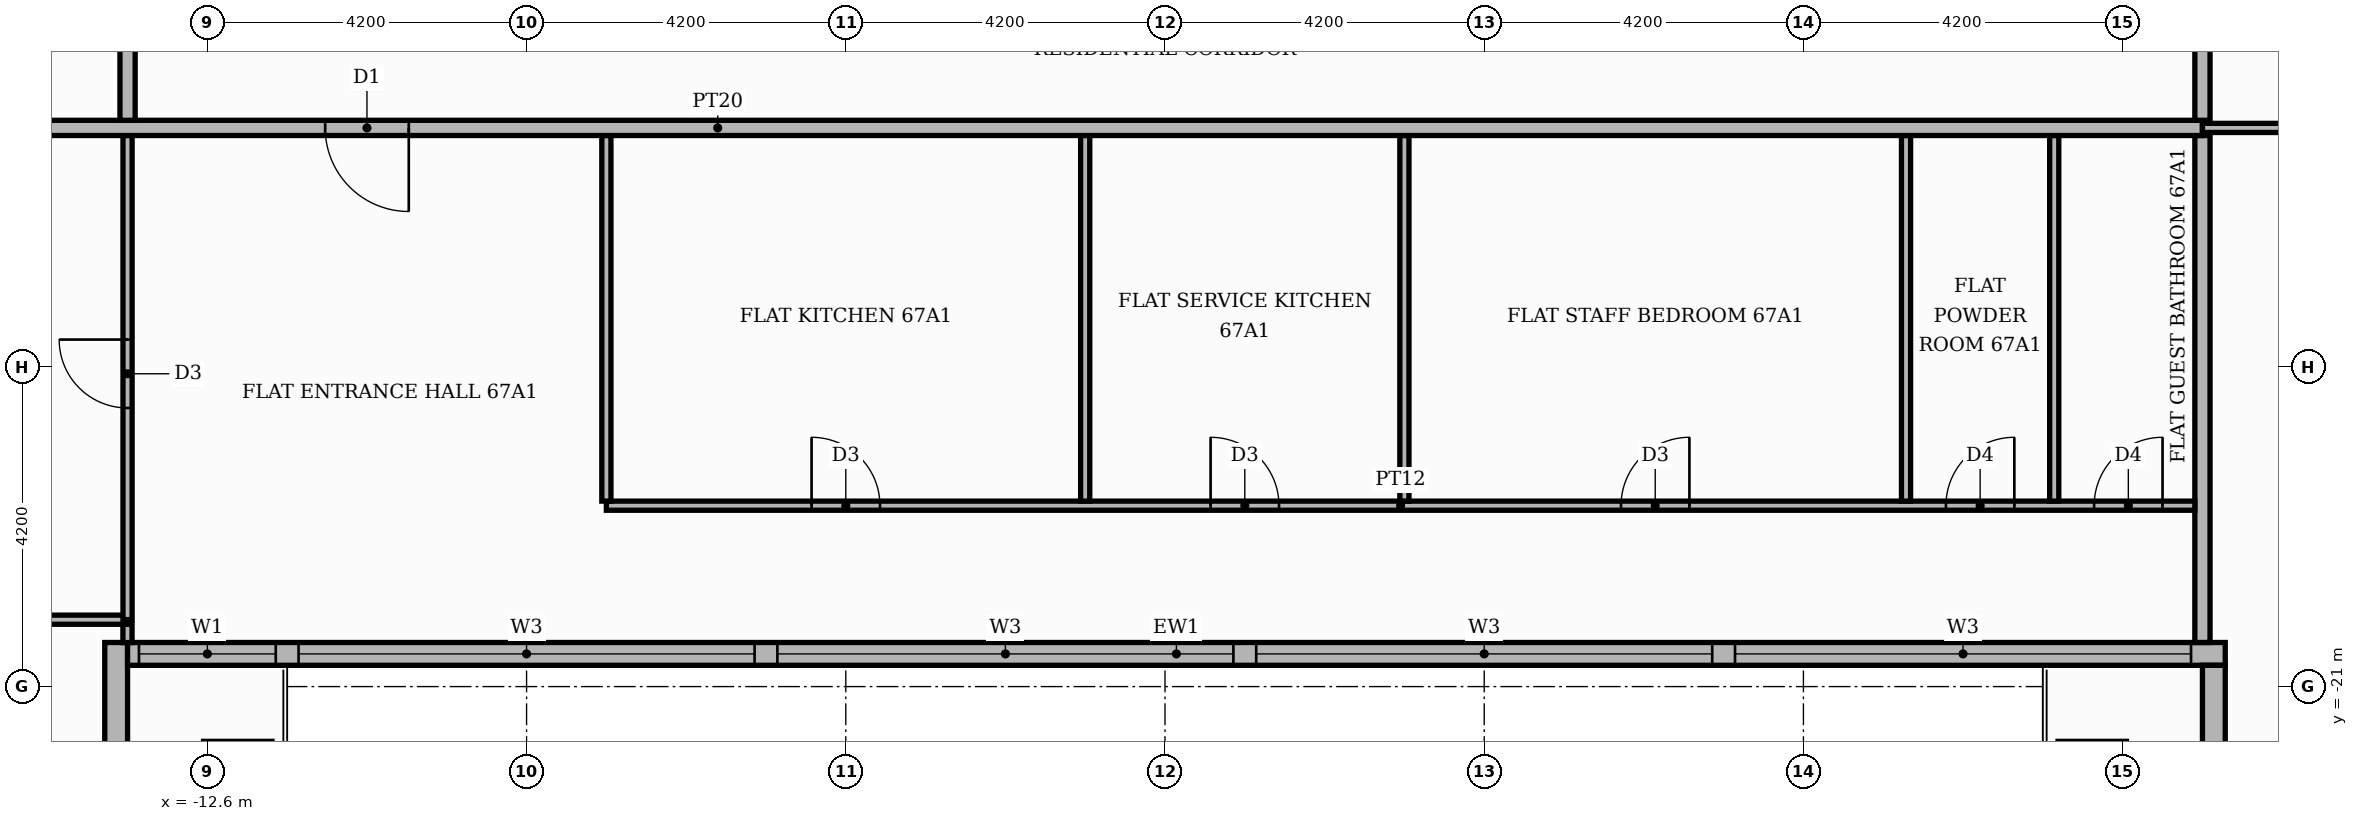
"""IFC4 building model, lengths in metres.
Left out: names, types, materials, properties, quantities, classifications, styles, units other than length and angle.
Written with IfcOpenShell. Run it as: python <this file> out.ifc"""

import sys

from ifc_helpers import new_model, si_unit, direction, frame, frame_2d, origin, place, context, subcontext, project, spatial, rectangle, extrude, element, fill, save


model = new_model("IFC4")
c1 = context("Model", 3, precision=1e-05, world=origin(), true_north=direction((0.0, 1.0)))
c2 = subcontext(c1, "Body", "Model", "MODEL_VIEW")
j1 = project(units=[si_unit("LENGTHUNIT", "METRE"), si_unit("PLANEANGLEUNIT", "RADIAN")], contexts=[c1])
p1 = place(None, origin())
s1 = spatial("IfcSite", under=j1, at=p1, CompositionType="ELEMENT")
p2 = place(p1, origin())
s2 = spatial("IfcBuilding", under=s1, at=p2, CompositionType="ELEMENT")
p3 = place(p2, frame((0.0, 0.0, 279.6)))
s3 = spatial("IfcBuildingStorey", under=s2, at=p3, CompositionType="ELEMENT", Elevation=279.6)
p4 = place(p3, frame((-13.8, -25.42, 0.0), z_axis=(0.0, 0.0, 1.0), x_axis=(0.0, 1.0, 0.0)))
e1 = element("IfcWall", 1, at=p4, inside=s3, PredefinedType="STANDARD", context=c2, shape_type="SweptSolid", body=[
    extrude(rectangle(XDim=5.0, YDim=0.3, at=frame_2d((2.5, 0.0))), origin(), (0.0, 0.0, 1.0), 3.48),
])
p5 = place(p4, frame((1.42, 0.0, 0.0)))
e2 = element("IfcOpeningElement", 2, at=p5, cuts=e1, PredefinedType="OPENING", context=c2, shape_type="SweptSolid", body=[
    extrude(rectangle(XDim=1.8, YDim=2.4, at=frame_2d((0.9, 1.2))), frame((0.0, 0.16, 0.0), z_axis=(0.0, -1.0, 0.0), x_axis=(1.0, 0.0, 0.0)), (0.0, 0.0, 1.0), 0.32),
])
p6 = place(p3, frame((-13.65, -20.57, 0.0), z_axis=(0.0, 0.0, 1.0), x_axis=(1.0, 0.0, 0.0)))
e3 = element("IfcWall", 3, at=p6, inside=s3, PredefinedType="STANDARD", context=c2, shape_type="SweptSolid", body=[
    extrude(rectangle(XDim=27.6, YDim=0.3, at=frame_2d((13.8, 0.0))), origin(), (0.0, 0.0, 1.0), 3.48),
])
p7 = place(p6, frame((0.15, 0.0, 0.9)))
e4 = element("IfcOpeningElement", 4, at=p7, cuts=e3, PredefinedType="OPENING", context=c2, shape_type="SweptSolid", body=[
    extrude(rectangle(XDim=1.8, YDim=2.1, at=frame_2d((0.9, 1.05))), frame((0.0, 0.16, 0.0), z_axis=(0.0, -1.0, 0.0), x_axis=(1.0, 0.0, 0.0)), (0.0, 0.0, 1.0), 0.32),
])
p8 = place(p6, frame((2.25, 0.0, 0.9)))
e5 = element("IfcOpeningElement", 5, at=p8, cuts=e3, PredefinedType="OPENING", context=c2, shape_type="SweptSolid", body=[
    extrude(rectangle(XDim=6.0, YDim=2.1, at=frame_2d((3.0, 1.05))), frame((0.0, 0.16, 0.0), z_axis=(0.0, -1.0, 0.0), x_axis=(1.0, 0.0, 0.0)), (0.0, 0.0, 1.0), 0.32),
])
p9 = place(p6, frame((8.55, 0.0, 0.9)))
e6 = element("IfcOpeningElement", 6, at=p9, cuts=e3, PredefinedType="OPENING", context=c2, shape_type="SweptSolid", body=[
    extrude(rectangle(XDim=6.0, YDim=2.1, at=frame_2d((3.0, 1.05))), frame((0.0, 0.16, 0.0), z_axis=(0.0, -1.0, 0.0), x_axis=(1.0, 0.0, 0.0)), (0.0, 0.0, 1.0), 0.32),
])
p10 = place(p6, frame((14.85, 0.0, 0.9)))
e7 = element("IfcOpeningElement", 7, at=p10, cuts=e3, PredefinedType="OPENING", context=c2, shape_type="SweptSolid", body=[
    extrude(rectangle(XDim=6.0, YDim=2.1, at=frame_2d((3.0, 1.05))), frame((0.0, 0.16, 0.0), z_axis=(0.0, -1.0, 0.0), x_axis=(1.0, 0.0, 0.0)), (0.0, 0.0, 1.0), 0.32),
])
p11 = place(p6, frame((21.15, 0.0, 0.9)))
e8 = element("IfcOpeningElement", 8, at=p11, cuts=e3, PredefinedType="OPENING", context=c2, shape_type="SweptSolid", body=[
    extrude(rectangle(XDim=6.0, YDim=2.1, at=frame_2d((3.0, 1.05))), frame((0.0, 0.16, 0.0), z_axis=(0.0, -1.0, 0.0), x_axis=(1.0, 0.0, 0.0)), (0.0, 0.0, 1.0), 0.32),
])
p12 = place(p3, frame((13.8, -20.72, 0.0), z_axis=(0.0, 0.0, 1.0), x_axis=(0.0, -1.0, 0.0)))
e9 = element("IfcWall", 9, at=p12, inside=s3, PredefinedType="STANDARD", context=c2, shape_type="SweptSolid", body=[
    extrude(rectangle(XDim=5.0, YDim=0.3, at=frame_2d((2.5, 0.0))), origin(), (0.0, 0.0, 1.0), 3.48),
])
p13 = place(p12, frame((1.48, 0.0, 0.0)))
e10 = element("IfcOpeningElement", 10, at=p13, cuts=e9, PredefinedType="OPENING", context=c2, shape_type="SweptSolid", body=[
    extrude(rectangle(XDim=1.8, YDim=2.4, at=frame_2d((0.9, 1.2))), frame((0.0, 0.16, 0.0), z_axis=(0.0, -1.0, 0.0), x_axis=(1.0, 0.0, 0.0)), (0.0, 0.0, 1.0), 0.32),
])
p14 = place(p3, frame((-13.651, -20.421, 0.0), z_axis=(0.0, 0.0, 1.0), x_axis=(0.0, 1.0, 0.0)))
e11 = element("IfcWall", 11, at=p14, inside=s3, PredefinedType="PARTITIONING", context=c2, shape_type="SweptSolid", body=[
    extrude(rectangle(XDim=0.241, YDim=0.12, at=frame_2d((0.121, 0.0))), origin(), (0.0, 0.0, 1.0), 3.48),
])
p15 = place(p3, frame((13.65, -20.42, 0.0), z_axis=(0.0, 0.0, 1.0), x_axis=(0.0, 1.0, 0.0)))
e12 = element("IfcWall", 12, at=p15, inside=s3, PredefinedType="PARTITIONING", context=c2, shape_type="SweptSolid", body=[
    extrude(rectangle(XDim=6.67, YDim=0.2, at=frame_2d((3.335, 0.0))), origin(), (0.0, 0.0, 1.0), 3.48),
])
p16 = place(p3, frame((-20.719, -20.12, 0.0), z_axis=(0.0, 0.0, 1.0), x_axis=(1.0, 0.0, 0.0)))
e13 = element("IfcWall", 13, at=p16, inside=s3, PredefinedType="PARTITIONING", context=c2, shape_type="SweptSolid", body=[
    extrude(rectangle(XDim=7.068, YDim=0.12, at=frame_2d((3.534, 0.0))), origin(), (0.0, 0.0, 1.0), 3.48),
])
p17 = place(p16, frame((4.094, 0.0, 0.0)))
e14 = element("IfcOpeningElement", 14, at=p17, cuts=e13, PredefinedType="OPENING", context=c2, shape_type="SweptSolid", body=[
    extrude(rectangle(XDim=1.0, YDim=2.1, at=frame_2d((0.5, 1.05))), frame((0.0, 0.07, 0.0), z_axis=(0.0, -1.0, 0.0), x_axis=(1.0, 0.0, 0.0)), (0.0, 0.0, 1.0), 0.14),
])
p18 = place(p3, frame((-13.65, -20.119, 0.0), z_axis=(0.0, 0.0, 1.0), x_axis=(0.0, 1.0, 0.0)))
e15 = element("IfcWall", 15, at=p18, inside=s3, PredefinedType="PARTITIONING", context=c2, shape_type="SweptSolid", body=[
    extrude(rectangle(XDim=6.369, YDim=0.12, at=frame_2d((3.185, 0.0))), origin(), (0.0, 0.0, 1.0), 3.48),
])
p19 = place(p18, frame((2.784, 0.0, 0.0)))
e16 = element("IfcOpeningElement", 16, at=p19, cuts=e15, PredefinedType="OPENING", context=c2, shape_type="SweptSolid", body=[
    extrude(rectangle(XDim=0.9, YDim=2.1, at=frame_2d((0.45, 1.05))), frame((0.0, 0.07, 0.0), z_axis=(0.0, -1.0, 0.0), x_axis=(1.0, 0.0, 0.0)), (0.0, 0.0, 1.0), 0.14),
])
p20 = place(p3, frame((-7.35, -18.62, 0.0), z_axis=(0.0, 0.0, 1.0), x_axis=(1.0, 0.0, 0.0)))
e17 = element("IfcWall", 17, at=p20, inside=s3, PredefinedType="PARTITIONING", context=c2, shape_type="SweptSolid", body=[
    extrude(rectangle(XDim=20.9, YDim=0.12, at=frame_2d((10.45, 0.0))), origin(), (0.0, 0.0, 1.0), 3.48),
])
p21 = place(p20, frame((2.7, 0.0, 0.0)))
e18 = element("IfcOpeningElement", 18, at=p21, cuts=e17, PredefinedType="OPENING", context=c2, shape_type="SweptSolid", body=[
    extrude(rectangle(XDim=0.9, YDim=2.1, at=frame_2d((0.45, 1.05))), frame((0.0, 0.07, 0.0), z_axis=(0.0, -1.0, 0.0), x_axis=(1.0, 0.0, 0.0)), (0.0, 0.0, 1.0), 0.14),
])
p22 = place(p20, frame((7.95, 0.0, 0.0)))
e19 = element("IfcOpeningElement", 19, at=p22, cuts=e17, PredefinedType="OPENING", context=c2, shape_type="SweptSolid", body=[
    extrude(rectangle(XDim=0.9, YDim=2.1, at=frame_2d((0.45, 1.05))), frame((0.0, 0.07, 0.0), z_axis=(0.0, -1.0, 0.0), x_axis=(1.0, 0.0, 0.0)), (0.0, 0.0, 1.0), 0.14),
])
p23 = place(p20, frame((13.35, 0.0, 0.0)))
e20 = element("IfcOpeningElement", 20, at=p23, cuts=e17, PredefinedType="OPENING", context=c2, shape_type="SweptSolid", body=[
    extrude(rectangle(XDim=0.9, YDim=2.1, at=frame_2d((0.45, 1.05))), frame((0.0, 0.07, 0.0), z_axis=(0.0, -1.0, 0.0), x_axis=(1.0, 0.0, 0.0)), (0.0, 0.0, 1.0), 0.14),
])
p24 = place(p20, frame((17.625, 0.0, 0.0)))
e21 = element("IfcOpeningElement", 21, at=p24, cuts=e17, PredefinedType="OPENING", context=c2, shape_type="SweptSolid", body=[
    extrude(rectangle(XDim=0.9, YDim=2.1, at=frame_2d((0.45, 1.05))), frame((0.0, 0.07, 0.0), z_axis=(0.0, -1.0, 0.0), x_axis=(1.0, 0.0, 0.0)), (0.0, 0.0, 1.0), 0.14),
])
p25 = place(p20, frame((19.575, 0.0, 0.0)))
e22 = element("IfcOpeningElement", 22, at=p25, cuts=e17, PredefinedType="OPENING", context=c2, shape_type="SweptSolid", body=[
    extrude(rectangle(XDim=0.9, YDim=2.1, at=frame_2d((0.45, 1.05))), frame((0.0, 0.07, 0.0), z_axis=(0.0, -1.0, 0.0), x_axis=(1.0, 0.0, 0.0)), (0.0, 0.0, 1.0), 0.14),
])
for number, where, z_axis, x_axis in (
    (23, (-7.35, -18.56, 0.0), (0.0, 0.0, 1.0), (0.0, 1.0, 0.0)),
    (24, (-1.05, -18.56, 0.0), (0.0, 0.0, 1.0), (0.0, 1.0, 0.0)),
    (25, (3.15, -18.56, 0.0), (0.0, 0.0, 1.0), (0.0, 1.0, 0.0)),
    (26, (9.75, -18.56, 0.0), (0.0, 0.0, 1.0), (0.0, 1.0, 0.0)),
    (27, (11.7, -18.56, 0.0), (0.0, 0.0, 1.0), (0.0, 1.0, 0.0)),
):
    element("IfcWall", number, at=place(p3, frame(where, z_axis=z_axis, x_axis=x_axis)), inside=s3, PredefinedType="PARTITIONING", context=c2, shape_type="SweptSolid", body=[
        extrude(rectangle(XDim=4.81, YDim=0.12, at=frame_2d((2.405, 0.0))), origin(), (0.0, 0.0, 1.0), 3.48),
    ])
p26 = place(p3, frame((-25.42, -13.65, 0.0), z_axis=(0.0, 0.0, 1.0), x_axis=(1.0, 0.0, 0.0)))
e28 = element("IfcWall", 28, at=p26, inside=s3, PredefinedType="PARTITIONING", context=c2, shape_type="SweptSolid", body=[
    extrude(rectangle(XDim=39.07, YDim=0.2, at=frame_2d((19.535, 0.0))), origin(), (0.0, 0.0, 1.0), 3.48),
])
p27 = place(p26, frame((14.37, 0.0, 0.0)))
e29 = element("IfcOpeningElement", 29, at=p27, cuts=e28, PredefinedType="OPENING", context=c2, shape_type="SweptSolid", body=[
    extrude(rectangle(XDim=1.1, YDim=2.4, at=frame_2d((0.55, 1.2))), frame((0.0, 0.11, 0.0), z_axis=(0.0, -1.0, 0.0), x_axis=(1.0, 0.0, 0.0)), (0.0, 0.0, 1.0), 0.22),
])
p28 = place(p3, frame((13.65, -13.65, 0.0), z_axis=(0.0, 0.0, 1.0), x_axis=(1.0, 0.0, 0.0)))
e30 = element("IfcWall", 30, at=p28, inside=s3, PredefinedType="PARTITIONING", context=c2, shape_type="SweptSolid", body=[
    extrude(rectangle(XDim=6.77, YDim=0.12, at=frame_2d((3.385, 0.0))), origin(), (0.0, 0.0, 1.0), 3.48),
])
p29 = place(p28, frame((2.885, 0.0, 0.0)))
e31 = element("IfcOpeningElement", 31, at=p29, cuts=e30, PredefinedType="OPENING", context=c2, shape_type="SweptSolid", body=[
    extrude(rectangle(XDim=1.0, YDim=2.1, at=frame_2d((0.5, 1.05))), frame((0.0, 0.07, 0.0), z_axis=(0.0, -1.0, 0.0), x_axis=(1.0, 0.0, 0.0)), (0.0, 0.0, 1.0), 0.14),
])
for number, where, z_axis, x_axis in (
    (32, (-13.65, -13.55, 0.0), (0.0, 0.0, 1.0), (0.0, 1.0, 0.0)),
    (33, (13.65, -13.55, 0.0), (0.0, 0.0, 1.0), (0.0, 1.0, 0.0)),
):
    element("IfcWall", number, at=place(p3, frame(where, z_axis=z_axis, x_axis=x_axis)), inside=s3, PredefinedType="PARTITIONING", context=c2, shape_type="SweptSolid", body=[
        extrude(rectangle(XDim=2.45, YDim=0.2, at=frame_2d((1.225, 0.0))), origin(), (0.0, 0.0, 1.0), 3.48),
    ])
p30 = place(p7, origin())
e34 = element("IfcWindow", 34, at=p30, inside=s3, PartitioningType="SINGLE_PANEL", PredefinedType="WINDOW", context=c2, shape_type="SweptSolid", body=[
    extrude(rectangle(XDim=1.8, YDim=2.1, at=frame_2d((0.9, 1.05))), frame((0.0, 0.03, 0.0), z_axis=(0.0, -1.0, 0.0), x_axis=(1.0, 0.0, 0.0)), (0.0, 0.0, 1.0), 0.06),
])
fill(e4, e34)
p31 = place(p8, origin())
e35 = element("IfcWindow", 35, at=p31, inside=s3, PartitioningType="SINGLE_PANEL", PredefinedType="WINDOW", context=c2, shape_type="SweptSolid", body=[
    extrude(rectangle(XDim=6.0, YDim=2.1, at=frame_2d((3.0, 1.05))), frame((0.0, 0.03, 0.0), z_axis=(0.0, -1.0, 0.0), x_axis=(1.0, 0.0, 0.0)), (0.0, 0.0, 1.0), 0.06),
])
fill(e5, e35)
p32 = place(p9, origin())
e36 = element("IfcWindow", 36, at=p32, inside=s3, PartitioningType="SINGLE_PANEL", PredefinedType="WINDOW", context=c2, shape_type="SweptSolid", body=[
    extrude(rectangle(XDim=6.0, YDim=2.1, at=frame_2d((3.0, 1.05))), frame((0.0, 0.03, 0.0), z_axis=(0.0, -1.0, 0.0), x_axis=(1.0, 0.0, 0.0)), (0.0, 0.0, 1.0), 0.06),
])
fill(e6, e36)
p33 = place(p10, origin())
e37 = element("IfcWindow", 37, at=p33, inside=s3, PartitioningType="SINGLE_PANEL", PredefinedType="WINDOW", context=c2, shape_type="SweptSolid", body=[
    extrude(rectangle(XDim=6.0, YDim=2.1, at=frame_2d((3.0, 1.05))), frame((0.0, 0.03, 0.0), z_axis=(0.0, -1.0, 0.0), x_axis=(1.0, 0.0, 0.0)), (0.0, 0.0, 1.0), 0.06),
])
fill(e7, e37)
p34 = place(p11, origin())
e38 = element("IfcWindow", 38, at=p34, inside=s3, PartitioningType="SINGLE_PANEL", PredefinedType="WINDOW", context=c2, shape_type="SweptSolid", body=[
    extrude(rectangle(XDim=6.0, YDim=2.1, at=frame_2d((3.0, 1.05))), frame((0.0, 0.03, 0.0), z_axis=(0.0, -1.0, 0.0), x_axis=(1.0, 0.0, 0.0)), (0.0, 0.0, 1.0), 0.06),
])
fill(e8, e38)
p35 = place(p27, frame((1.1, 0.0, 0.0), z_axis=(0.0, 0.0, 1.0), x_axis=(-1.0, 0.0, 0.0)))
e39 = element("IfcDoor", 39, at=p35, inside=s3, OperationType="SINGLE_SWING_RIGHT", PredefinedType="DOOR", context=c2, shape_type="SweptSolid", body=[
    extrude(rectangle(XDim=1.1, YDim=2.4, at=frame_2d((0.55, 1.2))), frame((0.0, 0.025, 0.0), z_axis=(0.0, -1.0, 0.0), x_axis=(1.0, 0.0, 0.0)), (0.0, 0.0, 1.0), 0.05),
])
fill(e29, e39)
p36 = place(p19, origin())
e40 = element("IfcDoor", 40, at=p36, inside=s3, OperationType="SINGLE_SWING_RIGHT", PredefinedType="DOOR", context=c2, shape_type="SweptSolid", body=[
    extrude(rectangle(XDim=0.9, YDim=2.1, at=frame_2d((0.45, 1.05))), frame((0.0, 0.025, 0.0), z_axis=(0.0, -1.0, 0.0), x_axis=(1.0, 0.0, 0.0)), (0.0, 0.0, 1.0), 0.05),
])
fill(e16, e40)
p37 = place(p21, origin())
e41 = element("IfcDoor", 41, at=p37, inside=s3, OperationType="SINGLE_SWING_LEFT", PredefinedType="DOOR", context=c2, shape_type="SweptSolid", body=[
    extrude(rectangle(XDim=0.9, YDim=2.1, at=frame_2d((0.45, 1.05))), frame((0.0, 0.025, 0.0), z_axis=(0.0, -1.0, 0.0), x_axis=(1.0, 0.0, 0.0)), (0.0, 0.0, 1.0), 0.05),
])
fill(e18, e41)
p38 = place(p22, origin())
e42 = element("IfcDoor", 42, at=p38, inside=s3, OperationType="SINGLE_SWING_LEFT", PredefinedType="DOOR", context=c2, shape_type="SweptSolid", body=[
    extrude(rectangle(XDim=0.9, YDim=2.1, at=frame_2d((0.45, 1.05))), frame((0.0, 0.025, 0.0), z_axis=(0.0, -1.0, 0.0), x_axis=(1.0, 0.0, 0.0)), (0.0, 0.0, 1.0), 0.05),
])
fill(e19, e42)
p39 = place(p23, origin())
e43 = element("IfcDoor", 43, at=p39, inside=s3, OperationType="SINGLE_SWING_RIGHT", PredefinedType="DOOR", context=c2, shape_type="SweptSolid", body=[
    extrude(rectangle(XDim=0.9, YDim=2.1, at=frame_2d((0.45, 1.05))), frame((0.0, 0.025, 0.0), z_axis=(0.0, -1.0, 0.0), x_axis=(1.0, 0.0, 0.0)), (0.0, 0.0, 1.0), 0.05),
])
fill(e20, e43)
p40 = place(p24, origin())
e44 = element("IfcDoor", 44, at=p40, inside=s3, OperationType="SINGLE_SWING_RIGHT", PredefinedType="DOOR", context=c2, shape_type="SweptSolid", body=[
    extrude(rectangle(XDim=0.9, YDim=2.1, at=frame_2d((0.45, 1.05))), frame((0.0, 0.025, 0.0), z_axis=(0.0, -1.0, 0.0), x_axis=(1.0, 0.0, 0.0)), (0.0, 0.0, 1.0), 0.05),
])
fill(e21, e44)
p41 = place(p25, origin())
e45 = element("IfcDoor", 45, at=p41, inside=s3, OperationType="SINGLE_SWING_RIGHT", PredefinedType="DOOR", context=c2, shape_type="SweptSolid", body=[
    extrude(rectangle(XDim=0.9, YDim=2.1, at=frame_2d((0.45, 1.05))), frame((0.0, 0.025, 0.0), z_axis=(0.0, -1.0, 0.0), x_axis=(1.0, 0.0, 0.0)), (0.0, 0.0, 1.0), 0.05),
])
fill(e22, e45)
save(model, sys.argv[1])
